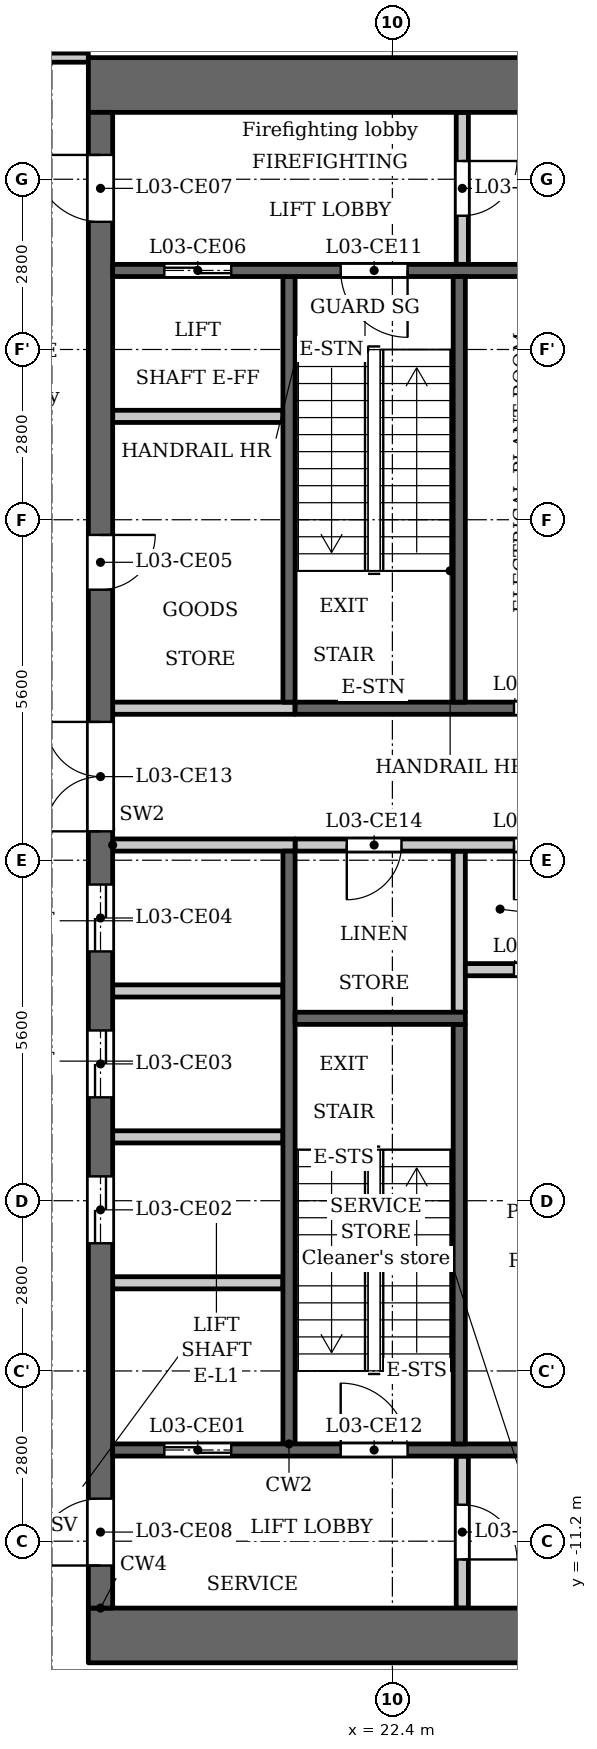
"""IFC4 building model, lengths in metres.
Left out: names, types, materials, properties, quantities, classifications, styles, units other than length and angle.
Written with IfcOpenShell. Run it as: python <this file> out.ifc"""

import sys

from ifc_helpers import new_model, si_unit, direction, frame, frame_2d, origin, place, context, subcontext, project, spatial, rectangle, extrude, element, fill, save


model = new_model("IFC4")
c1 = context("Model", 3, precision=1e-05, world=origin(), true_north=direction((0.0, 1.0)))
c2 = subcontext(c1, "Body", "Model", "MODEL_VIEW")
j1 = project(units=[si_unit("LENGTHUNIT", "METRE"), si_unit("PLANEANGLEUNIT", "RADIAN")], contexts=[c1])
p1 = place(None, origin())
s1 = spatial("IfcSite", under=j1, at=p1, CompositionType="ELEMENT")
p2 = place(p1, origin())
s2 = spatial("IfcBuilding", under=s1, at=p2, CompositionType="ELEMENT")
p3 = place(p2, frame((0.0, 0.0, 16.1)))
s3 = spatial("IfcBuildingStorey", under=s2, at=p3, CompositionType="ELEMENT", Elevation=16.1)
p4 = place(p3, frame((23.5, -2.5, 0.0), z_axis=(0.0, 0.0, 1.0), x_axis=(0.0, 1.0, 0.0)))
e1 = element("IfcWall", 1, at=p4, inside=s3, PredefinedType="PARTITIONING", context=c2, shape_type="SweptSolid", body=[
    extrude(rectangle(XDim=2.65, YDim=0.2, at=frame_2d((1.325, 0.0))), origin(), (0.0, 0.0, 1.0), 4.45),
])
p5 = place(p3, frame((20.7, 2.6, 0.0), z_axis=(0.0, 0.0, 1.0), x_axis=(0.0, 1.0, 0.0)))
e2 = element("IfcWall", 2, at=p5, inside=s3, PredefinedType="SHEAR", context=c2, shape_type="SweptSolid", body=[
    extrude(rectangle(XDim=7.0, YDim=0.2, at=frame_2d((3.5, 0.0))), origin(), (0.0, 0.0, 1.0), 4.45),
])
p6 = place(p3, frame((20.7, -9.6, 0.0), z_axis=(0.0, 0.0, 1.0), x_axis=(0.0, 1.0, 0.0)))
e3 = element("IfcWall", 3, at=p6, inside=s3, PredefinedType="SHEAR", context=c2, shape_type="SweptSolid", body=[
    extrude(rectangle(XDim=9.75, YDim=0.2, at=frame_2d((4.875, 0.0))), origin(), (0.0, 0.0, 1.0), 4.45),
])
p7 = place(p3, frame((20.8, 2.5, 0.0), z_axis=(0.0, 0.0, 1.0), x_axis=(1.0, 0.0, 0.0)))
e4 = element("IfcWall", 4, at=p7, inside=s3, PredefinedType="SHEAR", context=c2, shape_type="SweptSolid", body=[
    extrude(rectangle(XDim=5.3, YDim=0.2, at=frame_2d((2.65, 0.0))), origin(), (0.0, 0.0, 1.0), 4.45),
])
p8 = place(p7, frame((3.6, 0.0, 0.0)))
e5 = element("IfcOpeningElement", 5, at=p8, cuts=e4, PredefinedType="OPENING", context=c2, shape_type="SweptSolid", body=[
    extrude(rectangle(XDim=0.9, YDim=2.1, at=frame_2d((0.45, 1.05))), frame((0.0, 0.11, 0.0), z_axis=(0.0, -1.0, 0.0), x_axis=(1.0, 0.0, 0.0)), (0.0, 0.0, 1.0), 0.22),
])
p9 = place(p3, frame((20.8, 0.25, 0.0), z_axis=(0.0, 0.0, 1.0), x_axis=(1.0, 0.0, 0.0)))
e6 = element("IfcWall", 6, at=p9, inside=s3, PredefinedType="PARTITIONING", context=c2, shape_type="SweptSolid", body=[
    extrude(rectangle(XDim=5.3, YDim=0.2, at=frame_2d((2.65, 0.0))), origin(), (0.0, 0.0, 1.0), 4.45),
])
p10 = place(p9, frame((0.85, 0.0, 0.0)))
e7 = element("IfcOpeningElement", 7, at=p10, cuts=e6, PredefinedType="OPENING", context=c2, shape_type="SweptSolid", body=[
    extrude(rectangle(XDim=0.9, YDim=2.1, at=frame_2d((0.45, 1.05))), frame((0.0, 0.11, 0.0), z_axis=(0.0, -1.0, 0.0), x_axis=(1.0, 0.0, 0.0)), (0.0, 0.0, 1.0), 0.22),
])
p11 = place(p9, frame((3.6, 0.0, 0.0)))
e8 = element("IfcOpeningElement", 8, at=p11, cuts=e6, PredefinedType="OPENING", context=c2, shape_type="SweptSolid", body=[
    extrude(rectangle(XDim=0.9, YDim=2.1, at=frame_2d((0.45, 1.05))), frame((0.0, 0.11, 0.0), z_axis=(0.0, -1.0, 0.0), x_axis=(1.0, 0.0, 0.0)), (0.0, 0.0, 1.0), 0.22),
])
for number, where, z_axis, x_axis in (
    (9, (17.4, 12.75, 0.0), (0.0, 0.0, 1.0), (1.0, 0.0, 0.0)),
    (10, (17.4, -12.75, 0.0), (0.0, 0.0, 1.0), (1.0, 0.0, 0.0)),
):
    element("IfcWall", number, at=place(p3, frame(where, z_axis=z_axis, x_axis=x_axis)), inside=s3, PredefinedType="SHEAR", context=c2, shape_type="SweptSolid", body=[
        extrude(rectangle(XDim=10.4, YDim=0.9, at=frame_2d((5.2, 0.0))), origin(), (0.0, 0.0, 1.0), 4.45),
    ])
p12 = place(p3, frame((17.6, -12.3, 0.0), z_axis=(0.0, 0.0, 1.0), x_axis=(0.0, 1.0, 0.0)))
e11 = element("IfcWall", 11, at=p12, inside=s3, PredefinedType="SHEAR", context=c2, shape_type="SweptSolid", body=[
    extrude(rectangle(XDim=24.6, YDim=0.4, at=frame_2d((12.3, 0.0))), origin(), (0.0, 0.0, 1.0), 4.45),
])
p13 = place(p12, frame((6.0, 0.0, 0.0)))
e12 = element("IfcOpeningElement", 12, at=p13, cuts=e11, PredefinedType="OPENING", context=c2, shape_type="SweptSolid", body=[
    extrude(rectangle(XDim=1.1, YDim=2.1, at=frame_2d((0.55, 1.05))), frame((0.0, 0.21, 0.0), z_axis=(0.0, -1.0, 0.0), x_axis=(1.0, 0.0, 0.0)), (0.0, 0.0, 1.0), 0.42),
])
p14 = place(p12, frame((8.4, 0.0, 0.0)))
e13 = element("IfcOpeningElement", 13, at=p14, cuts=e11, PredefinedType="OPENING", context=c2, shape_type="SweptSolid", body=[
    extrude(rectangle(XDim=1.1, YDim=2.1, at=frame_2d((0.55, 1.05))), frame((0.0, 0.21, 0.0), z_axis=(0.0, -1.0, 0.0), x_axis=(1.0, 0.0, 0.0)), (0.0, 0.0, 1.0), 0.42),
])
p15 = place(p12, frame((10.8, 0.0, 0.0)))
e14 = element("IfcOpeningElement", 14, at=p15, cuts=e11, PredefinedType="OPENING", context=c2, shape_type="SweptSolid", body=[
    extrude(rectangle(XDim=1.1, YDim=2.1, at=frame_2d((0.55, 1.05))), frame((0.0, 0.21, 0.0), z_axis=(0.0, -1.0, 0.0), x_axis=(1.0, 0.0, 0.0)), (0.0, 0.0, 1.0), 0.42),
])
p16 = place(p12, frame((16.75, 0.0, 0.0)))
e15 = element("IfcOpeningElement", 15, at=p16, cuts=e11, PredefinedType="OPENING", context=c2, shape_type="SweptSolid", body=[
    extrude(rectangle(XDim=0.9, YDim=2.1, at=frame_2d((0.45, 1.05))), frame((0.0, 0.21, 0.0), z_axis=(0.0, -1.0, 0.0), x_axis=(1.0, 0.0, 0.0)), (0.0, 0.0, 1.0), 0.42),
])
p17 = place(p12, frame((22.8, 0.0, 0.0)))
e16 = element("IfcOpeningElement", 16, at=p17, cuts=e11, PredefinedType="OPENING", context=c2, shape_type="SweptSolid", body=[
    extrude(rectangle(XDim=1.1, YDim=2.1, at=frame_2d((0.55, 1.05))), frame((0.0, 0.21, 0.0), z_axis=(0.0, -1.0, 0.0), x_axis=(1.0, 0.0, 0.0)), (0.0, 0.0, 1.0), 0.42),
])
p18 = place(p12, frame((0.7, 0.0, 0.0)))
e17 = element("IfcOpeningElement", 17, at=p18, cuts=e11, PredefinedType="OPENING", context=c2, shape_type="SweptSolid", body=[
    extrude(rectangle(XDim=1.1, YDim=2.1, at=frame_2d((0.55, 1.05))), frame((0.0, 0.21, 0.0), z_axis=(0.0, -1.0, 0.0), x_axis=(1.0, 0.0, 0.0)), (0.0, 0.0, 1.0), 0.42),
])
p19 = place(p12, frame((12.775, 0.0, 0.0)))
e18 = element("IfcOpeningElement", 18, at=p19, cuts=e11, PredefinedType="OPENING", context=c2, shape_type="SweptSolid", body=[
    extrude(rectangle(XDim=1.8, YDim=2.1, at=frame_2d((0.9, 1.05))), frame((0.0, 0.21, 0.0), z_axis=(0.0, -1.0, 0.0), x_axis=(1.0, 0.0, 0.0)), (0.0, 0.0, 1.0), 0.42),
])
p20 = place(p3, frame((23.55, 9.8, 0.0), z_axis=(0.0, 0.0, 1.0), x_axis=(0.0, 1.0, 0.0)))
e19 = element("IfcWall", 19, at=p20, inside=s3, PredefinedType="PARTITIONING", context=c2, shape_type="SweptSolid", body=[
    extrude(rectangle(XDim=2.5, YDim=0.2, at=frame_2d((1.25, 0.0))), origin(), (0.0, 0.0, 1.0), 4.45),
])
p21 = place(p20, frame((0.8, 0.0, 0.0)))
e20 = element("IfcOpeningElement", 20, at=p21, cuts=e19, PredefinedType="OPENING", context=c2, shape_type="SweptSolid", body=[
    extrude(rectangle(XDim=0.9, YDim=2.1, at=frame_2d((0.45, 1.05))), frame((0.0, 0.11, 0.0), z_axis=(0.0, -1.0, 0.0), x_axis=(1.0, 0.0, 0.0)), (0.0, 0.0, 1.0), 0.22),
])
p22 = place(p3, frame((23.55, -12.3, 0.0), z_axis=(0.0, 0.0, 1.0), x_axis=(0.0, 1.0, 0.0)))
e21 = element("IfcWall", 21, at=p22, inside=s3, PredefinedType="PARTITIONING", context=c2, shape_type="SweptSolid", body=[
    extrude(rectangle(XDim=2.5, YDim=0.2, at=frame_2d((1.25, 0.0))), origin(), (0.0, 0.0, 1.0), 4.45),
])
p23 = place(p22, frame((0.8, 0.0, 0.0)))
e22 = element("IfcOpeningElement", 22, at=p23, cuts=e21, PredefinedType="OPENING", context=c2, shape_type="SweptSolid", body=[
    extrude(rectangle(XDim=0.9, YDim=2.1, at=frame_2d((0.45, 1.05))), frame((0.0, 0.11, 0.0), z_axis=(0.0, -1.0, 0.0), x_axis=(1.0, 0.0, 0.0)), (0.0, 0.0, 1.0), 0.22),
])
p24 = place(p3, frame((23.6, -1.8, 0.0), z_axis=(0.0, 0.0, 1.0), x_axis=(1.0, 0.0, 0.0)))
e23 = element("IfcWall", 23, at=p24, inside=s3, PredefinedType="PARTITIONING", context=c2, shape_type="SweptSolid", body=[
    extrude(rectangle(XDim=2.5, YDim=0.2, at=frame_2d((1.25, 0.0))), origin(), (0.0, 0.0, 1.0), 4.45),
])
p25 = place(p24, frame((0.8, 0.0, 0.0)))
e24 = element("IfcOpeningElement", 24, at=p25, cuts=e23, PredefinedType="OPENING", context=c2, shape_type="SweptSolid", body=[
    extrude(rectangle(XDim=0.9, YDim=2.1, at=frame_2d((0.45, 1.05))), frame((0.0, 0.11, 0.0), z_axis=(0.0, -1.0, 0.0), x_axis=(1.0, 0.0, 0.0)), (0.0, 0.0, 1.0), 0.22),
])
p26 = place(p3, frame((17.8, -9.7, 0.0), z_axis=(0.0, 0.0, 1.0), x_axis=(1.0, 0.0, 0.0)))
e25 = element("IfcWall", 25, at=p26, inside=s3, PredefinedType="SHEAR", context=c2, shape_type="SweptSolid", body=[
    extrude(rectangle(XDim=8.3, YDim=0.2, at=frame_2d((4.15, 0.0))), origin(), (0.0, 0.0, 1.0), 4.45),
])
p27 = place(p26, frame((0.85, 0.0, 0.0)))
e26 = element("IfcOpeningElement", 26, at=p27, cuts=e25, PredefinedType="OPENING", context=c2, shape_type="SweptSolid", body=[
    extrude(rectangle(XDim=1.1, YDim=2.1, at=frame_2d((0.55, 1.05))), frame((0.0, 0.11, 0.0), z_axis=(0.0, -1.0, 0.0), x_axis=(1.0, 0.0, 0.0)), (0.0, 0.0, 1.0), 0.22),
])
p28 = place(p26, frame((3.75, 0.0, 0.0)))
e27 = element("IfcOpeningElement", 27, at=p28, cuts=e25, PredefinedType="OPENING", context=c2, shape_type="SweptSolid", body=[
    extrude(rectangle(XDim=1.1, YDim=2.1, at=frame_2d((0.55, 1.05))), frame((0.0, 0.11, 0.0), z_axis=(0.0, -1.0, 0.0), x_axis=(1.0, 0.0, 0.0)), (0.0, 0.0, 1.0), 0.22),
])
for number, where, z_axis, x_axis in (
    (28, (17.8, -6.95, 0.0), (0.0, 0.0, 1.0), (1.0, 0.0, 0.0)),
    (29, (17.8, -4.55, 0.0), (0.0, 0.0, 1.0), (1.0, 0.0, 0.0)),
    (30, (17.8, -2.15, 0.0), (0.0, 0.0, 1.0), (1.0, 0.0, 0.0)),
):
    element("IfcWall", number, at=place(p3, frame(where, z_axis=z_axis, x_axis=x_axis)), inside=s3, PredefinedType="PARTITIONING", context=c2, shape_type="SweptSolid", body=[
        extrude(rectangle(XDim=2.8, YDim=0.2, at=frame_2d((1.4, 0.0))), origin(), (0.0, 0.0, 1.0), 4.45),
    ])
for number, where, z_axis, x_axis in (
    (31, (17.8, 0.25, 0.0), (0.0, 0.0, 1.0), (1.0, 0.0, 0.0)),
    (32, (17.8, 2.5, 0.0), (0.0, 0.0, 1.0), (1.0, 0.0, 0.0)),
):
    element("IfcWall", number, at=place(p3, frame(where, z_axis=z_axis, x_axis=x_axis)), inside=s3, PredefinedType="PARTITIONING", context=c2, shape_type="SweptSolid", body=[
        extrude(rectangle(XDim=3.0, YDim=0.2, at=frame_2d((1.5, 0.0))), origin(), (0.0, 0.0, 1.0), 4.45),
    ])
p29 = place(p3, frame((17.8, 7.3, 0.0), z_axis=(0.0, 0.0, 1.0), x_axis=(1.0, 0.0, 0.0)))
e33 = element("IfcWall", 33, at=p29, inside=s3, PredefinedType="PARTITIONING", context=c2, shape_type="SweptSolid", body=[
    extrude(rectangle(XDim=2.8, YDim=0.2, at=frame_2d((1.4, 0.0))), origin(), (0.0, 0.0, 1.0), 4.45),
])
p30 = place(p3, frame((17.8, 9.7, 0.0), z_axis=(0.0, 0.0, 1.0), x_axis=(1.0, 0.0, 0.0)))
e34 = element("IfcWall", 34, at=p30, inside=s3, PredefinedType="SHEAR", context=c2, shape_type="SweptSolid", body=[
    extrude(rectangle(XDim=8.3, YDim=0.2, at=frame_2d((4.15, 0.0))), origin(), (0.0, 0.0, 1.0), 4.45),
])
p31 = place(p30, frame((0.85, 0.0, 0.0)))
e35 = element("IfcOpeningElement", 35, at=p31, cuts=e34, PredefinedType="OPENING", context=c2, shape_type="SweptSolid", body=[
    extrude(rectangle(XDim=1.1, YDim=2.1, at=frame_2d((0.55, 1.05))), frame((0.0, 0.11, 0.0), z_axis=(0.0, -1.0, 0.0), x_axis=(1.0, 0.0, 0.0)), (0.0, 0.0, 1.0), 0.22),
])
p32 = place(p30, frame((3.75, 0.0, 0.0)))
e36 = element("IfcOpeningElement", 36, at=p32, cuts=e34, PredefinedType="OPENING", context=c2, shape_type="SweptSolid", body=[
    extrude(rectangle(XDim=1.1, YDim=2.1, at=frame_2d((0.55, 1.05))), frame((0.0, 0.11, 0.0), z_axis=(0.0, -1.0, 0.0), x_axis=(1.0, 0.0, 0.0)), (0.0, 0.0, 1.0), 0.22),
])
p33 = place(p3, frame((23.5, 2.6, 0.0), z_axis=(0.0, 0.0, 1.0), x_axis=(0.0, 1.0, 0.0)))
e37 = element("IfcWall", 37, at=p33, inside=s3, PredefinedType="SHEAR", context=c2, shape_type="SweptSolid", body=[
    extrude(rectangle(XDim=7.0, YDim=0.2, at=frame_2d((3.5, 0.0))), origin(), (0.0, 0.0, 1.0), 4.45),
])
p34 = place(p3, frame((23.5, -9.6, 0.0), z_axis=(0.0, 0.0, 1.0), x_axis=(0.0, 1.0, 0.0)))
e38 = element("IfcWall", 38, at=p34, inside=s3, PredefinedType="SHEAR", context=c2, shape_type="SweptSolid", body=[
    extrude(rectangle(XDim=6.9, YDim=0.2, at=frame_2d((3.45, 0.0))), origin(), (0.0, 0.0, 1.0), 4.45),
])
p35 = place(p3, frame((20.8, -2.6, 0.0), z_axis=(0.0, 0.0, 1.0), x_axis=(1.0, 0.0, 0.0)))
e39 = element("IfcWall", 39, at=p35, inside=s3, PredefinedType="SHEAR", context=c2, shape_type="SweptSolid", body=[
    extrude(rectangle(XDim=2.8, YDim=0.2, at=frame_2d((1.4, 0.0))), origin(), (0.0, 0.0, 1.0), 4.45),
])
p36 = place(p3, frame((-17.4, 13.2, 0.0), z_axis=(0.0, 0.0, 1.0), x_axis=(1.0, 0.0, 0.0)))
e40 = element("IfcWall", 40, at=p36, inside=s3, PredefinedType="PARTITIONING", context=c2, shape_type="SweptSolid", body=[
    extrude(rectangle(XDim=34.8, YDim=0.15, at=frame_2d((17.4, 0.0))), origin(), (0.0, 0.0, 1.0), 4.45),
])
p37 = place(p36, frame((3.05, 0.0, 0.0)))
e41 = element("IfcOpeningElement", 41, at=p37, cuts=e40, PredefinedType="OPENING", context=c2, shape_type="SweptSolid", body=[
    extrude(rectangle(XDim=1.8, YDim=2.1, at=frame_2d((0.9, 1.05))), frame((0.0, 0.085, 0.0), z_axis=(0.0, -1.0, 0.0), x_axis=(1.0, 0.0, 0.0)), (0.0, 0.0, 1.0), 0.17),
])
p38 = place(p36, frame((0.75, 0.0, 0.0)))
e42 = element("IfcOpeningElement", 42, at=p38, cuts=e40, PredefinedType="OPENING", context=c2, shape_type="SweptSolid", body=[
    extrude(rectangle(XDim=1.0, YDim=2.1, at=frame_2d((0.5, 1.05))), frame((0.0, 0.085, 0.0), z_axis=(0.0, -1.0, 0.0), x_axis=(1.0, 0.0, 0.0)), (0.0, 0.0, 1.0), 0.17),
])
p39 = place(p36, frame((33.15, 0.0, 0.0)))
e43 = element("IfcOpeningElement", 43, at=p39, cuts=e40, PredefinedType="OPENING", context=c2, shape_type="SweptSolid", body=[
    extrude(rectangle(XDim=1.0, YDim=2.1, at=frame_2d((0.5, 1.05))), frame((0.0, 0.085, 0.0), z_axis=(0.0, -1.0, 0.0), x_axis=(1.0, 0.0, 0.0)), (0.0, 0.0, 1.0), 0.17),
])
p40 = place(p27, origin())
e44 = element("IfcDoor", 44, at=p40, inside=s3, OperationType="DOUBLE_DOOR_SLIDING", PredefinedType="DOOR", context=c2, shape_type="SweptSolid", body=[
    extrude(rectangle(XDim=1.1, YDim=2.1, at=frame_2d((0.55, 1.05))), frame((0.0, 0.025, 0.0), z_axis=(0.0, -1.0, 0.0), x_axis=(1.0, 0.0, 0.0)), (0.0, 0.0, 1.0), 0.05),
])
fill(e26, e44)
p41 = place(p13, origin())
e45 = element("IfcDoor", 45, at=p41, inside=s3, OperationType="DOUBLE_DOOR_SLIDING", PredefinedType="DOOR", context=c2, shape_type="SweptSolid", body=[
    extrude(rectangle(XDim=1.1, YDim=2.1, at=frame_2d((0.55, 1.05))), frame((0.0, 0.025, 0.0), z_axis=(0.0, -1.0, 0.0), x_axis=(1.0, 0.0, 0.0)), (0.0, 0.0, 1.0), 0.05),
])
fill(e12, e45)
p42 = place(p14, origin())
e46 = element("IfcDoor", 46, at=p42, inside=s3, OperationType="DOUBLE_DOOR_SLIDING", PredefinedType="DOOR", context=c2, shape_type="SweptSolid", body=[
    extrude(rectangle(XDim=1.1, YDim=2.1, at=frame_2d((0.55, 1.05))), frame((0.0, 0.025, 0.0), z_axis=(0.0, -1.0, 0.0), x_axis=(1.0, 0.0, 0.0)), (0.0, 0.0, 1.0), 0.05),
])
fill(e13, e46)
p43 = place(p15, origin())
e47 = element("IfcDoor", 47, at=p43, inside=s3, OperationType="DOUBLE_DOOR_SLIDING", PredefinedType="DOOR", context=c2, shape_type="SweptSolid", body=[
    extrude(rectangle(XDim=1.1, YDim=2.1, at=frame_2d((0.55, 1.05))), frame((0.0, 0.025, 0.0), z_axis=(0.0, -1.0, 0.0), x_axis=(1.0, 0.0, 0.0)), (0.0, 0.0, 1.0), 0.05),
])
fill(e14, e47)
p44 = place(p16, origin())
e48 = element("IfcDoor", 48, at=p44, inside=s3, OperationType="SINGLE_SWING_RIGHT", PredefinedType="DOOR", context=c2, shape_type="SweptSolid", body=[
    extrude(rectangle(XDim=0.9, YDim=2.1, at=frame_2d((0.45, 1.05))), frame((0.0, 0.025, 0.0), z_axis=(0.0, -1.0, 0.0), x_axis=(1.0, 0.0, 0.0)), (0.0, 0.0, 1.0), 0.05),
])
fill(e15, e48)
p45 = place(p31, origin())
e49 = element("IfcDoor", 49, at=p45, inside=s3, OperationType="DOUBLE_DOOR_SLIDING", PredefinedType="DOOR", context=c2, shape_type="SweptSolid", body=[
    extrude(rectangle(XDim=1.1, YDim=2.1, at=frame_2d((0.55, 1.05))), frame((0.0, 0.025, 0.0), z_axis=(0.0, -1.0, 0.0), x_axis=(1.0, 0.0, 0.0)), (0.0, 0.0, 1.0), 0.05),
])
fill(e35, e49)
p46 = place(p17, origin())
e50 = element("IfcDoor", 50, at=p46, inside=s3, OperationType="SINGLE_SWING_LEFT", PredefinedType="DOOR", context=c2, shape_type="SweptSolid", body=[
    extrude(rectangle(XDim=1.1, YDim=2.1, at=frame_2d((0.55, 1.05))), frame((0.0, 0.025, 0.0), z_axis=(0.0, -1.0, 0.0), x_axis=(1.0, 0.0, 0.0)), (0.0, 0.0, 1.0), 0.05),
])
fill(e16, e50)
p47 = place(p18, origin())
e51 = element("IfcDoor", 51, at=p47, inside=s3, OperationType="SINGLE_SWING_RIGHT", PredefinedType="DOOR", context=c2, shape_type="SweptSolid", body=[
    extrude(rectangle(XDim=1.1, YDim=2.1, at=frame_2d((0.55, 1.05))), frame((0.0, 0.025, 0.0), z_axis=(0.0, -1.0, 0.0), x_axis=(1.0, 0.0, 0.0)), (0.0, 0.0, 1.0), 0.05),
])
fill(e17, e51)
p48 = place(p21, origin())
e52 = element("IfcDoor", 52, at=p48, inside=s3, OperationType="SINGLE_SWING_RIGHT", PredefinedType="DOOR", context=c2, shape_type="SweptSolid", body=[
    extrude(rectangle(XDim=0.9, YDim=2.1, at=frame_2d((0.45, 1.05))), frame((0.0, 0.025, 0.0), z_axis=(0.0, -1.0, 0.0), x_axis=(1.0, 0.0, 0.0)), (0.0, 0.0, 1.0), 0.05),
])
fill(e20, e52)
p49 = place(p23, origin())
e53 = element("IfcDoor", 53, at=p49, inside=s3, OperationType="SINGLE_SWING_LEFT", PredefinedType="DOOR", context=c2, shape_type="SweptSolid", body=[
    extrude(rectangle(XDim=0.9, YDim=2.1, at=frame_2d((0.45, 1.05))), frame((0.0, 0.025, 0.0), z_axis=(0.0, -1.0, 0.0), x_axis=(1.0, 0.0, 0.0)), (0.0, 0.0, 1.0), 0.05),
])
fill(e22, e53)
p50 = place(p32, origin())
e54 = element("IfcDoor", 54, at=p50, inside=s3, OperationType="SINGLE_SWING_RIGHT", PredefinedType="DOOR", context=c2, shape_type="SweptSolid", body=[
    extrude(rectangle(XDim=1.1, YDim=2.1, at=frame_2d((0.55, 1.05))), frame((0.0, 0.025, 0.0), z_axis=(0.0, -1.0, 0.0), x_axis=(1.0, 0.0, 0.0)), (0.0, 0.0, 1.0), 0.05),
])
fill(e36, e54)
p51 = place(p28, origin())
e55 = element("IfcDoor", 55, at=p51, inside=s3, OperationType="SINGLE_SWING_RIGHT", PredefinedType="DOOR", context=c2, shape_type="SweptSolid", body=[
    extrude(rectangle(XDim=1.1, YDim=2.1, at=frame_2d((0.55, 1.05))), frame((0.0, 0.025, 0.0), z_axis=(0.0, -1.0, 0.0), x_axis=(1.0, 0.0, 0.0)), (0.0, 0.0, 1.0), 0.05),
])
fill(e27, e55)
p52 = place(p19, origin())
e56 = element("IfcDoor", 56, at=p52, inside=s3, OperationType="DOUBLE_DOOR_SINGLE_SWING", PredefinedType="DOOR", context=c2, shape_type="SweptSolid", body=[
    extrude(rectangle(XDim=1.8, YDim=2.1, at=frame_2d((0.9, 1.05))), frame((0.0, 0.025, 0.0), z_axis=(0.0, -1.0, 0.0), x_axis=(1.0, 0.0, 0.0)), (0.0, 0.0, 1.0), 0.05),
])
fill(e18, e56)
p53 = place(p10, origin())
e57 = element("IfcDoor", 57, at=p53, inside=s3, OperationType="SINGLE_SWING_LEFT", PredefinedType="DOOR", context=c2, shape_type="SweptSolid", body=[
    extrude(rectangle(XDim=0.9, YDim=2.1, at=frame_2d((0.45, 1.05))), frame((0.0, 0.025, 0.0), z_axis=(0.0, -1.0, 0.0), x_axis=(1.0, 0.0, 0.0)), (0.0, 0.0, 1.0), 0.05),
])
fill(e7, e57)
p54 = place(p25, origin())
e58 = element("IfcDoor", 58, at=p54, inside=s3, OperationType="SINGLE_SWING_LEFT", PredefinedType="DOOR", context=c2, shape_type="SweptSolid", body=[
    extrude(rectangle(XDim=0.9, YDim=2.1, at=frame_2d((0.45, 1.05))), frame((0.0, 0.025, 0.0), z_axis=(0.0, -1.0, 0.0), x_axis=(1.0, 0.0, 0.0)), (0.0, 0.0, 1.0), 0.05),
])
fill(e24, e58)
p55 = place(p11, origin())
e59 = element("IfcDoor", 59, at=p55, inside=s3, OperationType="SINGLE_SWING_LEFT", PredefinedType="DOOR", context=c2, shape_type="SweptSolid", body=[
    extrude(rectangle(XDim=0.9, YDim=2.1, at=frame_2d((0.45, 1.05))), frame((0.0, 0.025, 0.0), z_axis=(0.0, -1.0, 0.0), x_axis=(1.0, 0.0, 0.0)), (0.0, 0.0, 1.0), 0.05),
])
fill(e8, e59)
p56 = place(p8, origin())
e60 = element("IfcDoor", 60, at=p56, inside=s3, OperationType="SINGLE_SWING_LEFT", PredefinedType="DOOR", context=c2, shape_type="SweptSolid", body=[
    extrude(rectangle(XDim=0.9, YDim=2.1, at=frame_2d((0.45, 1.05))), frame((0.0, 0.025, 0.0), z_axis=(0.0, -1.0, 0.0), x_axis=(1.0, 0.0, 0.0)), (0.0, 0.0, 1.0), 0.05),
])
fill(e5, e60)
save(model, sys.argv[1])
